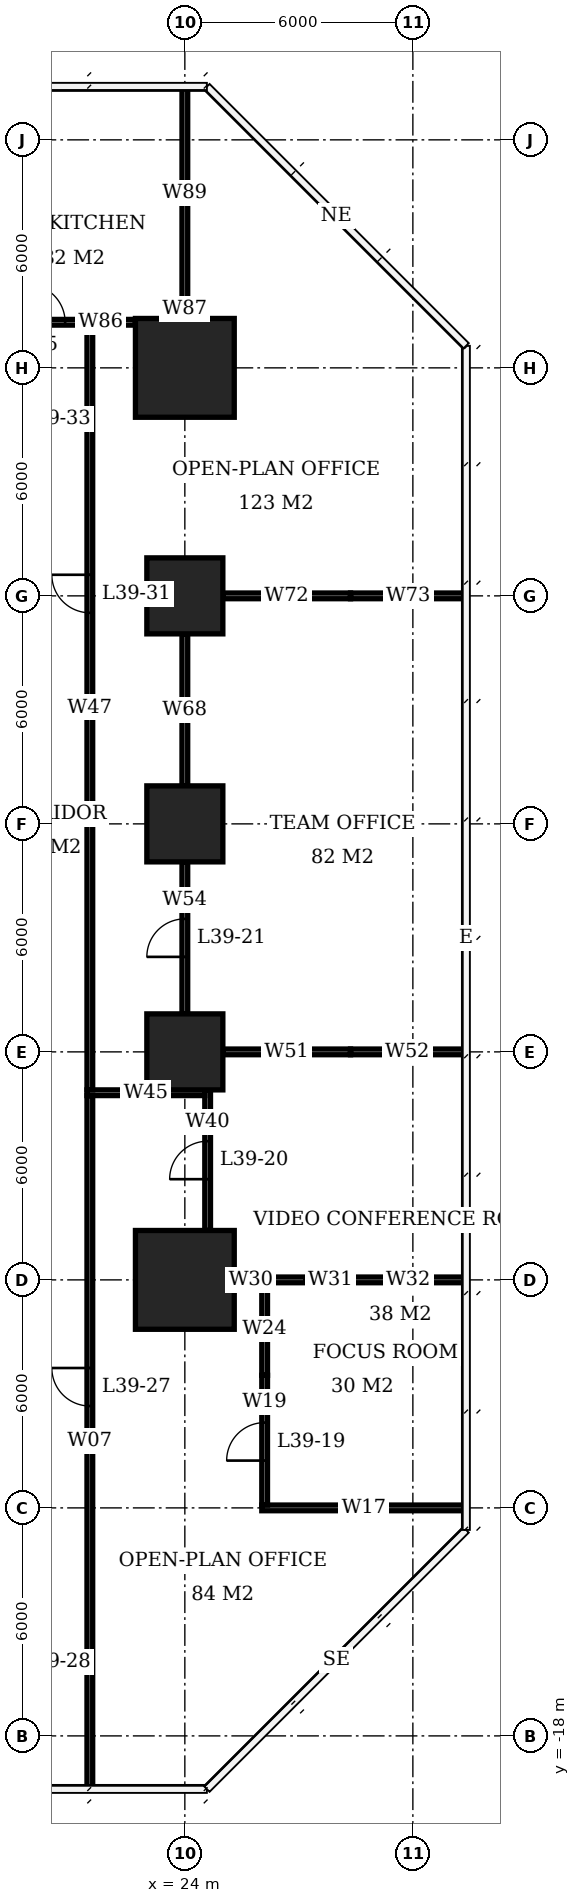
"""IFC4 building model, lengths in metres.
Left out: names, types, materials, properties, quantities, classifications, styles, units other than length and angle.
Written with IfcOpenShell. Run it as: python <this file> out.ifc"""

import sys

from ifc_helpers import new_model, si_unit, direction, frame, frame_2d, origin, origin_2d, place, context, subcontext, project, spatial, rectangle, extrude, element, fill, save


model = new_model("IFC4")
c1 = context("Model", 3, precision=1e-05, world=origin(), true_north=direction((0.0, 1.0)))
c2 = subcontext(c1, "Body", "Model", "MODEL_VIEW")
j1 = project(units=[si_unit("LENGTHUNIT", "METRE"), si_unit("PLANEANGLEUNIT", "RADIAN")], contexts=[c1])
p1 = place(None, origin())
s1 = spatial("IfcSite", under=j1, at=p1, CompositionType="ELEMENT")
p2 = place(p1, origin())
s2 = spatial("IfcBuilding", under=s1, at=p2, CompositionType="ELEMENT")
p3 = place(p2, frame((0.0, 0.0, 160.1)))
s3 = spatial("IfcBuildingStorey", under=s2, at=p3, CompositionType="ELEMENT", Elevation=160.1)
p4 = place(p3, frame((24.0, -6.0, 0.0), z_axis=(0.0, 0.0, 1.0), x_axis=(1.0, 0.0, 0.0)))
e1 = element("IfcColumn", 1, at=p4, inside=s3, PredefinedType="COLUMN", context=c2, shape_type="SweptSolid", body=[
    extrude(rectangle(XDim=2.6, YDim=2.6, at=origin_2d()), origin(), (0.0, 0.0, 1.0), 3.9),
])
for number, where, z_axis, x_axis in (
    (2, (24.0, 0.0, 0.0), (0.0, 0.0, 1.0), (1.0, 0.0, 0.0)),
    (3, (24.0, 6.0, 0.0), (0.0, 0.0, 1.0), (1.0, 0.0, 0.0)),
    (4, (24.0, 12.0, 0.0), (0.0, 0.0, 1.0), (1.0, 0.0, 0.0)),
):
    element("IfcColumn", number, at=place(p3, frame(where, z_axis=z_axis, x_axis=x_axis)), inside=s3, PredefinedType="COLUMN", context=c2, shape_type="SweptSolid", body=[
        extrude(rectangle(XDim=2.0, YDim=2.0, at=origin_2d()), origin(), (0.0, 0.0, 1.0), 3.9),
    ])
p5 = place(p3, frame((24.0, 18.0, 0.0), z_axis=(0.0, 0.0, 1.0), x_axis=(1.0, 0.0, 0.0)))
e5 = element("IfcColumn", 5, at=p5, inside=s3, PredefinedType="COLUMN", context=c2, shape_type="SweptSolid", body=[
    extrude(rectangle(XDim=2.6, YDim=2.6, at=origin_2d()), origin(), (0.0, 0.0, 1.0), 3.9),
])
p6 = place(p3, frame((26.025, -12.0, 0.0), z_axis=(0.0, 0.0, 1.0), x_axis=(1.0, 0.0, 0.0)))
e6 = element("IfcWall", 6, at=p6, inside=s3, PredefinedType="PARTITIONING", context=c2, shape_type="SweptSolid", body=[
    extrude(rectangle(XDim=5.375, YDim=0.15, at=frame_2d((2.688, 0.0))), origin(), (0.0, 0.0, 1.0), 3.65),
])
p7 = place(p3, frame((25.3, -6.0, 0.0), z_axis=(0.0, 0.0, 1.0), x_axis=(1.0, 0.0, 0.0)))
e7 = element("IfcWall", 7, at=p7, inside=s3, PredefinedType="PARTITIONING", context=c2, shape_type="SweptSolid", body=[
    extrude(rectangle(XDim=0.875, YDim=0.15, at=frame_2d((0.438, 0.0))), origin(), (0.0, 0.0, 1.0), 2.15),
])
p8 = place(p3, frame((26.1, -6.0, 0.0), z_axis=(0.0, 0.0, 1.0), x_axis=(1.0, 0.0, 0.0)))
e8 = element("IfcWall", 8, at=p8, inside=s3, PredefinedType="PARTITIONING", context=c2, shape_type="SweptSolid", body=[
    extrude(rectangle(XDim=2.26, YDim=0.15, at=frame_2d((1.13, 0.0))), origin(), (0.0, 0.0, 1.0), 2.15),
])
p9 = place(p3, frame((28.36, -6.0, 0.0), z_axis=(0.0, 0.0, 1.0), x_axis=(1.0, 0.0, 0.0)))
e9 = element("IfcWall", 9, at=p9, inside=s3, PredefinedType="PARTITIONING", context=c2, shape_type="SweptSolid", body=[
    extrude(rectangle(XDim=3.04, YDim=0.15, at=frame_2d((1.52, 0.0))), origin(), (0.0, 0.0, 1.0), 3.65),
])
p10 = place(p3, frame((25.0, 0.0, 0.0), z_axis=(0.0, 0.0, 1.0), x_axis=(1.0, 0.0, 0.0)))
e10 = element("IfcWall", 10, at=p10, inside=s3, PredefinedType="PARTITIONING", context=c2, shape_type="SweptSolid", body=[
    extrude(rectangle(XDim=3.36, YDim=0.15, at=frame_2d((1.68, 0.0))), origin(), (0.0, 0.0, 1.0), 2.15),
])
p11 = place(p3, frame((28.36, 0.0, 0.0), z_axis=(0.0, 0.0, 1.0), x_axis=(1.0, 0.0, 0.0)))
e11 = element("IfcWall", 11, at=p11, inside=s3, PredefinedType="PARTITIONING", context=c2, shape_type="SweptSolid", body=[
    extrude(rectangle(XDim=2.99, YDim=0.15, at=frame_2d((1.495, 0.0))), origin(), (0.0, 0.0, 1.0), 3.65),
])
p12 = place(p3, frame((25.0, 12.0, 0.0), z_axis=(0.0, 0.0, 1.0), x_axis=(1.0, 0.0, 0.0)))
e12 = element("IfcWall", 12, at=p12, inside=s3, PredefinedType="PARTITIONING", context=c2, shape_type="SweptSolid", body=[
    extrude(rectangle(XDim=3.36, YDim=0.15, at=frame_2d((1.68, 0.0))), origin(), (0.0, 0.0, 1.0), 2.15),
])
p13 = place(p3, frame((28.36, 12.0, 0.0), z_axis=(0.0, 0.0, 1.0), x_axis=(1.0, 0.0, 0.0)))
e13 = element("IfcWall", 13, at=p13, inside=s3, PredefinedType="PARTITIONING", context=c2, shape_type="SweptSolid", body=[
    extrude(rectangle(XDim=3.04, YDim=0.15, at=frame_2d((1.52, 0.0))), origin(), (0.0, 0.0, 1.0), 3.65),
])
p14 = place(p3, frame((18.075, 19.2, 0.0), z_axis=(0.0, 0.0, 1.0), x_axis=(1.0, 0.0, 0.0)))
e14 = element("IfcWall", 14, at=p14, inside=s3, PredefinedType="PARTITIONING", context=c2, shape_type="SweptSolid", body=[
    extrude(rectangle(XDim=4.625, YDim=0.15, at=frame_2d((2.312, 0.0))), origin(), (0.0, 0.0, 1.0), 3.65),
])
p15 = place(p14, frame((1.775, 0.0, 0.0)))
e15 = element("IfcOpeningElement", 15, at=p15, cuts=e14, PredefinedType="OPENING", context=c2, shape_type="SweptSolid", body=[
    extrude(rectangle(XDim=1.0, YDim=2.1, at=frame_2d((0.5, 1.05))), frame((0.0, 0.085, 0.0), z_axis=(0.0, -1.0, 0.0), x_axis=(1.0, 0.0, 0.0)), (0.0, 0.0, 1.0), 0.17),
])
p16 = place(p3, frame((24.0, 1.0, 0.0), z_axis=(0.0, 0.0, 1.0), x_axis=(0.0, 1.0, 0.0)))
e16 = element("IfcWall", 16, at=p16, inside=s3, PredefinedType="PARTITIONING", context=c2, shape_type="SweptSolid", body=[
    extrude(rectangle(XDim=4.0, YDim=0.15, at=frame_2d((2.0, 0.0))), origin(), (0.0, 0.0, 1.0), 3.65),
])
p17 = place(p16, frame((1.5, 0.0, 0.0)))
e17 = element("IfcOpeningElement", 17, at=p17, cuts=e16, PredefinedType="OPENING", context=c2, shape_type="SweptSolid", body=[
    extrude(rectangle(XDim=1.0, YDim=2.1, at=frame_2d((0.5, 1.05))), frame((0.0, 0.085, 0.0), z_axis=(0.0, -1.0, 0.0), x_axis=(1.0, 0.0, 0.0)), (0.0, 0.0, 1.0), 0.17),
])
p18 = place(p3, frame((24.0, 7.0, 0.0), z_axis=(0.0, 0.0, 1.0), x_axis=(0.0, 1.0, 0.0)))
e18 = element("IfcWall", 18, at=p18, inside=s3, PredefinedType="PARTITIONING", context=c2, shape_type="SweptSolid", body=[
    extrude(rectangle(XDim=4.0, YDim=0.15, at=frame_2d((2.0, 0.0))), origin(), (0.0, 0.0, 1.0), 3.65),
])
p19 = place(p3, frame((24.0, 19.3, 0.0), z_axis=(0.0, 0.0, 1.0), x_axis=(0.0, 1.0, 0.0)))
e19 = element("IfcWall", 19, at=p19, inside=s3, PredefinedType="PARTITIONING", context=c2, shape_type="SweptSolid", body=[
    extrude(rectangle(XDim=0.492, YDim=0.15, at=frame_2d((0.246, 0.0))), origin(), (0.0, 0.0, 1.0), 2.15),
])
p20 = place(p3, frame((24.0, 19.792, 0.0), z_axis=(0.0, 0.0, 1.0), x_axis=(0.0, 1.0, 0.0)))
e20 = element("IfcWall", 20, at=p20, inside=s3, PredefinedType="PARTITIONING", context=c2, shape_type="SweptSolid", body=[
    extrude(rectangle(XDim=5.597, YDim=0.15, at=frame_2d((2.799, 0.0))), origin(), (0.0, 0.0, 1.0), 3.65),
])
p21 = place(p3, frame((24.6, -4.7, 0.0), z_axis=(0.0, 0.0, 1.0), x_axis=(0.0, 1.0, 0.0)))
e21 = element("IfcWall", 21, at=p21, inside=s3, PredefinedType="PARTITIONING", context=c2, shape_type="SweptSolid", body=[
    extrude(rectangle(XDim=3.7, YDim=0.15, at=frame_2d((1.85, 0.0))), origin(), (0.0, 0.0, 1.0), 3.65),
])
p22 = place(p21, frame((1.35, 0.0, 0.0)))
e22 = element("IfcOpeningElement", 22, at=p22, cuts=e21, PredefinedType="OPENING", context=c2, shape_type="SweptSolid", body=[
    extrude(rectangle(XDim=1.0, YDim=2.1, at=frame_2d((0.5, 1.05))), frame((0.0, 0.085, 0.0), z_axis=(0.0, -1.0, 0.0), x_axis=(1.0, 0.0, 0.0)), (0.0, 0.0, 1.0), 0.17),
])
p23 = place(p3, frame((26.1, -11.925, 0.0), z_axis=(0.0, 0.0, 1.0), x_axis=(0.0, 1.0, 0.0)))
e23 = element("IfcWall", 23, at=p23, inside=s3, PredefinedType="PARTITIONING", context=c2, shape_type="SweptSolid", body=[
    extrude(rectangle(XDim=3.414, YDim=0.15, at=frame_2d((1.707, 0.0))), origin(), (0.0, 0.0, 1.0), 3.65),
])
p24 = place(p23, frame((1.17, 0.0, 0.0)))
e24 = element("IfcOpeningElement", 24, at=p24, cuts=e23, PredefinedType="OPENING", context=c2, shape_type="SweptSolid", body=[
    extrude(rectangle(XDim=1.0, YDim=2.1, at=frame_2d((0.5, 1.05))), frame((0.0, 0.085, 0.0), z_axis=(0.0, -1.0, 0.0), x_axis=(1.0, 0.0, 0.0)), (0.0, 0.0, 1.0), 0.17),
])
p25 = place(p3, frame((26.1, -8.511, 0.0), z_axis=(0.0, 0.0, 1.0), x_axis=(0.0, 1.0, 0.0)))
e25 = element("IfcWall", 25, at=p25, inside=s3, PredefinedType="PARTITIONING", context=c2, shape_type="SweptSolid", body=[
    extrude(rectangle(XDim=2.436, YDim=0.15, at=frame_2d((1.218, 0.0))), origin(), (0.0, 0.0, 1.0), 2.15),
])
p26 = place(p3, frame((21.5, -19.35, 0.0), z_axis=(0.0, 0.0, 1.0), x_axis=(0.0, 1.0, 0.0)))
e26 = element("IfcWall", 26, at=p26, inside=s3, PredefinedType="PARTITIONING", context=c2, shape_type="SweptSolid", body=[
    extrude(rectangle(XDim=18.2, YDim=0.15, at=frame_2d((9.1, 0.0))), origin(), (0.0, 0.0, 1.0), 3.65),
])
p27 = place(p26, frame((10.031, 0.0, 0.0)))
e27 = element("IfcOpeningElement", 27, at=p27, cuts=e26, PredefinedType="OPENING", context=c2, shape_type="SweptSolid", body=[
    extrude(rectangle(XDim=1.0, YDim=2.1, at=frame_2d((0.5, 1.05))), frame((0.0, 0.085, 0.0), z_axis=(0.0, -1.0, 0.0), x_axis=(1.0, 0.0, 0.0)), (0.0, 0.0, 1.0), 0.17),
])
p28 = place(p3, frame((21.5, -1.0, 0.0), z_axis=(0.0, 0.0, 1.0), x_axis=(0.0, 1.0, 0.0)))
e28 = element("IfcWall", 28, at=p28, inside=s3, PredefinedType="PARTITIONING", context=c2, shape_type="SweptSolid", body=[
    extrude(rectangle(XDim=20.125, YDim=0.15, at=frame_2d((10.062, 0.0))), origin(), (0.0, 0.0, 1.0), 3.65),
])
p29 = place(p28, frame((12.555, 0.0, 0.0)))
e29 = element("IfcOpeningElement", 29, at=p29, cuts=e28, PredefinedType="OPENING", context=c2, shape_type="SweptSolid", body=[
    extrude(rectangle(XDim=1.0, YDim=2.1, at=frame_2d((0.5, 1.05))), frame((0.0, 0.085, 0.0), z_axis=(0.0, -1.0, 0.0), x_axis=(1.0, 0.0, 0.0)), (0.0, 0.0, 1.0), 0.17),
])
p30 = place(p3, frame((21.425, -1.075, 0.0), z_axis=(0.0, 0.0, 1.0), x_axis=(1.0, 0.0, 0.0)))
e30 = element("IfcWall", 30, at=p30, inside=s3, PredefinedType="PARTITIONING", context=c2, shape_type="SweptSolid", body=[
    extrude(rectangle(XDim=3.1, YDim=0.15, at=frame_2d((1.55, 0.0))), origin(), (0.0, 0.0, 1.0), 3.65),
])
p31 = place(p24, origin())
e31 = element("IfcDoor", 31, at=p31, inside=s3, OperationType="SINGLE_SWING_LEFT", PredefinedType="DOOR", context=c2, shape_type="SweptSolid", body=[
    extrude(rectangle(XDim=1.0, YDim=2.1, at=frame_2d((0.5, 1.05))), frame((0.0, 0.025, 0.0), z_axis=(0.0, -1.0, 0.0), x_axis=(1.0, 0.0, 0.0)), (0.0, 0.0, 1.0), 0.05),
])
fill(e24, e31)
p32 = place(p22, origin())
e32 = element("IfcDoor", 32, at=p32, inside=s3, OperationType="SINGLE_SWING_LEFT", PredefinedType="DOOR", context=c2, shape_type="SweptSolid", body=[
    extrude(rectangle(XDim=1.0, YDim=2.1, at=frame_2d((0.5, 1.05))), frame((0.0, 0.025, 0.0), z_axis=(0.0, -1.0, 0.0), x_axis=(1.0, 0.0, 0.0)), (0.0, 0.0, 1.0), 0.05),
])
fill(e22, e32)
p33 = place(p17, origin())
e33 = element("IfcDoor", 33, at=p33, inside=s3, OperationType="SINGLE_SWING_LEFT", PredefinedType="DOOR", context=c2, shape_type="SweptSolid", body=[
    extrude(rectangle(XDim=1.0, YDim=2.1, at=frame_2d((0.5, 1.05))), frame((0.0, 0.025, 0.0), z_axis=(0.0, -1.0, 0.0), x_axis=(1.0, 0.0, 0.0)), (0.0, 0.0, 1.0), 0.05),
])
fill(e17, e33)
p34 = place(p15, origin())
e34 = element("IfcDoor", 34, at=p34, inside=s3, OperationType="SINGLE_SWING_LEFT", PredefinedType="DOOR", context=c2, shape_type="SweptSolid", body=[
    extrude(rectangle(XDim=1.0, YDim=2.1, at=frame_2d((0.5, 1.05))), frame((0.0, 0.025, 0.0), z_axis=(0.0, -1.0, 0.0), x_axis=(1.0, 0.0, 0.0)), (0.0, 0.0, 1.0), 0.05),
])
fill(e15, e34)
p35 = place(p27, origin())
e35 = element("IfcDoor", 35, at=p35, inside=s3, OperationType="SINGLE_SWING_RIGHT", PredefinedType="DOOR", context=c2, shape_type="SweptSolid", body=[
    extrude(rectangle(XDim=1.0, YDim=2.1, at=frame_2d((0.5, 1.05))), frame((0.0, 0.025, 0.0), z_axis=(0.0, -1.0, 0.0), x_axis=(1.0, 0.0, 0.0)), (0.0, 0.0, 1.0), 0.05),
])
fill(e27, e35)
p36 = place(p29, origin())
e36 = element("IfcDoor", 36, at=p36, inside=s3, OperationType="SINGLE_SWING_RIGHT", PredefinedType="DOOR", context=c2, shape_type="SweptSolid", body=[
    extrude(rectangle(XDim=1.0, YDim=2.1, at=frame_2d((0.5, 1.05))), frame((0.0, 0.025, 0.0), z_axis=(0.0, -1.0, 0.0), x_axis=(1.0, 0.0, 0.0)), (0.0, 0.0, 1.0), 0.05),
])
fill(e29, e36)
save(model, sys.argv[1])
